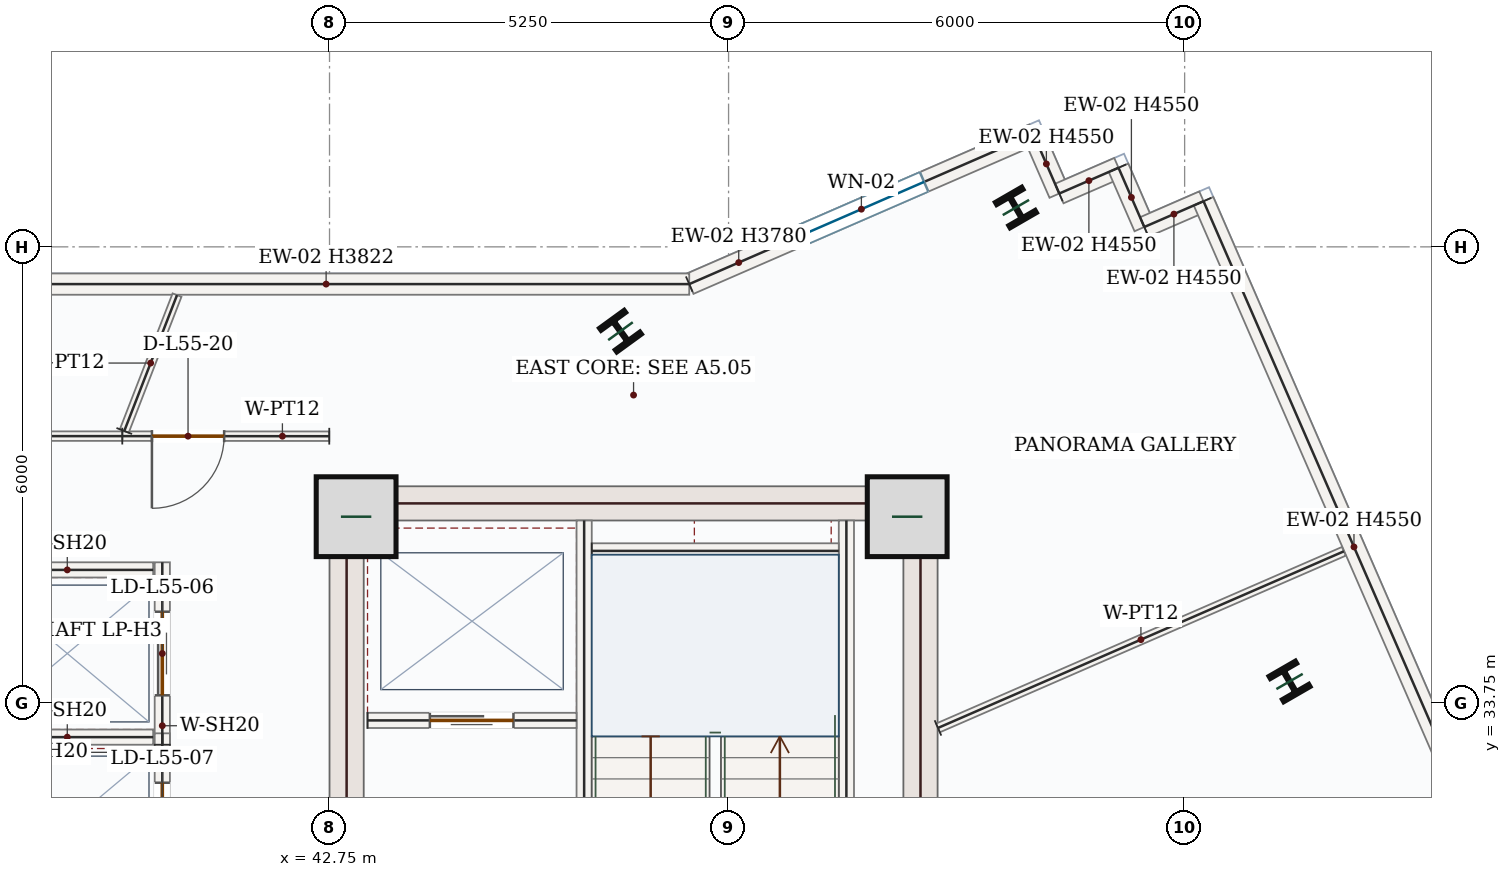
"""IFC4 building model, lengths in metres.
Left out: names, types, materials, properties, quantities, classifications, styles, units other than length and angle.
Written with IfcOpenShell. Run it as: python <this file> out.ifc"""

import sys

from ifc_helpers import new_model, si_unit, direction, frame, frame_2d, origin, origin_2d, place, context, subcontext, project, spatial, rectangle, i_section, extrude, source, transform, mapped, element, fill, save


model = new_model("IFC4")
c1 = context("Model", 3, precision=1e-05, world=origin(), true_north=direction((0.0, 1.0)))
c2 = subcontext(c1, "Body", "Model", "MODEL_VIEW")
j1 = project(units=[si_unit("LENGTHUNIT", "METRE"), si_unit("PLANEANGLEUNIT", "RADIAN")], contexts=[c1])
p1 = place(None, origin())
s1 = spatial("IfcSite", under=j1, at=p1, CompositionType="ELEMENT")
p2 = place(p1, origin())
s2 = spatial("IfcBuilding", under=s1, at=p2, CompositionType="ELEMENT")
p3 = place(p2, frame((0.0, 0.0, 234.3)))
s3 = spatial("IfcBuildingStorey", under=s2, at=p3, CompositionType="ELEMENT", Elevation=234.3)
p4 = place(p3, frame((42.975, 28.05, 0.0), z_axis=(0.0, 0.0, 1.0), x_axis=(0.0, 1.0, 0.0)))
e1 = element("IfcWall", 1, at=p4, inside=s3, PredefinedType="SHEAR", context=c2, shape_type="SweptSolid", body=[
    extrude(rectangle(XDim=8.55, YDim=0.45, at=frame_2d((4.275, 0.0))), origin(), (0.0, 0.0, 1.0), 4.55),
])
p5 = place(p4, frame((1.5, 0.0, 0.0)))
e2 = element("IfcOpeningElement", 2, at=p5, cuts=e1, PredefinedType="OPENING", context=c2, shape_type="SweptSolid", body=[
    extrude(rectangle(XDim=1.1, YDim=2.2, at=frame_2d((0.55, 1.1))), frame((0.0, 0.235, 0.0), z_axis=(0.0, -1.0, 0.0), x_axis=(1.0, 0.0, 0.0)), (0.0, 0.0, 1.0), 0.47),
])
m1 = source(origin(), c2, "Body", "SweptSolid", [
    extrude(rectangle(XDim=8.55, YDim=0.45, at=frame_2d((4.275, 0.0))), origin(), (0.0, 0.0, 1.0), 4.55),
])
p6 = place(p3, frame((50.525, 28.05, 0.0), z_axis=(0.0, 0.0, 1.0), x_axis=(0.0, 1.0, 0.0)))
e3 = element("IfcWall", 3, at=p6, inside=s3, PredefinedType="SHEAR", context=c2, shape_type="MappedRepresentation", body=[
    mapped(m1, transform((0.0, 0.0, 0.0), x_axis=(1.0, 0.0, 0.0), y_axis=(0.0, 1.0, 0.0), z_axis=(0.0, 0.0, 1.0), scale=1.0)),
])
m2 = source(origin(), c2, "Body", "SweptSolid", [
    extrude(rectangle(XDim=7.1, YDim=0.45, at=frame_2d((3.55, 0.0))), origin(), (0.0, 0.0, 1.0), 4.55),
])
p7 = place(p3, frame((43.2, 36.375, 0.0), z_axis=(0.0, 0.0, 1.0), x_axis=(1.0, 0.0, 0.0)))
e4 = element("IfcWall", 4, at=p7, inside=s3, PredefinedType="SHEAR", context=c2, shape_type="MappedRepresentation", body=[
    mapped(m2, transform((0.0, 0.0, 0.0), x_axis=(1.0, 0.0, 0.0), y_axis=(0.0, 1.0, 0.0), z_axis=(0.0, 0.0, 1.0), scale=1.0)),
])
m3 = source(origin(), c2, "Body", "SweptSolid", [
    extrude(rectangle(XDim=1.05, YDim=1.05, at=origin_2d()), origin(), (0.0, 0.0, 1.0), 4.8),
])
for number, where, z_axis, x_axis in (
    (5, (43.1, 36.2, 0.0), (0.0, 0.0, 1.0), (1.0, 0.0, 0.0)),
    (6, (50.35, 36.2, 0.0), (0.0, 0.0, 1.0), (1.0, 0.0, 0.0)),
):
    element("IfcColumn", number, at=place(p3, frame(where, z_axis=z_axis, x_axis=x_axis)), inside=s3, PredefinedType="COLUMN", context=c2, shape_type="MappedRepresentation", body=[
        mapped(m3, transform((0.0, 0.0, 0.0), x_axis=(1.0, 0.0, 0.0), y_axis=(0.0, 1.0, 0.0), z_axis=(0.0, 0.0, 1.0), scale=1.0)),
    ])
m4 = source(origin(), c2, "Body", "SweptSolid", [
    extrude(i_section(OverallWidth=0.399, OverallDepth=0.386, WebThickness=0.021, FlangeThickness=0.033, FilletRadius=0.018, at=origin_2d()), origin(), (0.0, 0.0, 1.0), 4.8),
])
for number, where, z_axis, x_axis in (
    (7, (46.578, 38.641, 0.0), (0.0, 0.0, 1.0), (0.809, 0.588, 0.0)),
    (8, (55.38, 34.032, 0.0), (0.0, 0.0, 1.0), (0.866, 0.5, 0.0)),
    (9, (51.78, 40.268, 0.0), (0.0, 0.0, 1.0), (0.866, 0.5, 0.0)),
):
    element("IfcColumn", number, at=place(p3, frame(where, z_axis=z_axis, x_axis=x_axis)), inside=s3, PredefinedType="COLUMN", context=c2, shape_type="MappedRepresentation", body=[
        mapped(m4, transform((0.0, 0.0, 0.0), x_axis=(1.0, 0.0, 0.0), y_axis=(0.0, 1.0, 0.0), z_axis=(0.0, 0.0, 1.0), scale=1.0)),
    ])
p8 = place(p3, frame((47.482, 39.26, 0.0), z_axis=(0.0, 0.0, 1.0), x_axis=(0.916937202251, 0.399031536509, 0.0)))
e10 = element("IfcWall", 10, at=p8, inside=s3, PredefinedType="SOLIDWALL", context=c2, shape_type="SweptSolid", body=[
    extrude(rectangle(XDim=4.939, YDim=0.28, at=frame_2d((2.47, 0.0))), origin(), (0.0, 0.0, 1.0), 3.78),
])
p9 = place(p8, frame((1.57, 0.0, 0.85)))
e11 = element("IfcOpeningElement", 11, at=p9, cuts=e10, PredefinedType="OPENING", context=c2, shape_type="SweptSolid", body=[
    extrude(rectangle(XDim=1.8, YDim=1.75, at=frame_2d((0.9, 0.875))), frame((0.0, 0.15, 0.0), z_axis=(0.0, -1.0, 0.0), x_axis=(1.0, 0.0, 0.0)), (0.0, 0.0, 1.0), 0.3),
])
m5 = source(origin(), c2, "Body", "SweptSolid", [
    extrude(rectangle(XDim=0.85, YDim=0.28, at=frame_2d((0.425, 0.0))), origin(), (0.0, 0.0, 1.0), 4.55),
])
for number, where, z_axis, x_axis in (
    (12, (52.011, 41.231, 0.0), (0.0, 0.0, 1.0), (0.399, -0.917, 0.0)),
    (13, (52.351, 40.451, 0.0), (0.0, 0.0, 1.0), (0.917, 0.399, 0.0)),
):
    element("IfcWall", number, at=place(p3, frame(where, z_axis=z_axis, x_axis=x_axis)), inside=s3, PredefinedType="SOLIDWALL", context=c2, shape_type="MappedRepresentation", body=[
        mapped(m5, transform((0.0, 0.0, 0.0), x_axis=(1.0, 0.0, 0.0), y_axis=(0.0, 1.0, 0.0), z_axis=(0.0, 0.0, 1.0), scale=1.0)),
    ])
m6 = source(origin(), c2, "Body", "SweptSolid", [
    extrude(rectangle(XDim=0.85, YDim=0.28, at=frame_2d((0.425, 0.0))), origin(), (0.0, 0.0, 1.0), 4.55),
])
p10 = place(p3, frame((53.13, 40.791, 0.0), z_axis=(0.0, 0.0, 1.0), x_axis=(0.399009702756, -0.916946703526, 0.0)))
e14 = element("IfcWall", 14, at=p10, inside=s3, PredefinedType="SOLIDWALL", context=c2, shape_type="MappedRepresentation", body=[
    mapped(m6, transform((0.0, 0.0, 0.0), x_axis=(1.0, 0.0, 0.0), y_axis=(0.0, 1.0, 0.0), z_axis=(0.0, 0.0, 1.0), scale=1.0)),
])
p11 = place(p3, frame((53.469, 40.011, 0.0), z_axis=(0.0, 0.0, 1.0), x_axis=(0.916992420403, 0.398904626351, 0.0)))
e15 = element("IfcWall", 15, at=p11, inside=s3, PredefinedType="SOLIDWALL", context=c2, shape_type="MappedRepresentation", body=[
    mapped(m5, transform((0.0, 0.0, 0.0), x_axis=(1.0, 0.0, 0.0), y_axis=(0.0, 1.0, 0.0), z_axis=(0.0, 0.0, 1.0), scale=1.0)),
])
m7 = source(origin(), c2, "Body", "SweptSolid", [
    extrude(rectangle(XDim=9.92, YDim=0.28, at=frame_2d((4.96, 0.0))), origin(), (0.0, 0.0, 1.0), 4.55),
])
p12 = place(p3, frame((54.249, 40.35, 0.0), z_axis=(0.0, 0.0, 1.0), x_axis=(0.398992471769, -0.916954201404, 0.0)))
e16 = element("IfcWall", 16, at=p12, inside=s3, PredefinedType="SOLIDWALL", context=c2, shape_type="MappedRepresentation", body=[
    mapped(m7, transform((0.0, 0.0, 0.0), x_axis=(1.0, 0.0, 0.0), y_axis=(0.0, 1.0, 0.0), z_axis=(0.0, 0.0, 1.0), scale=1.0)),
])
m8 = source(origin(), c2, "Body", "SweptSolid", [
    extrude(rectangle(XDim=9.554, YDim=0.28, at=frame_2d((4.777, 0.0))), origin(), (0.0, 0.0, 1.0), 3.822),
])
p13 = place(p3, frame((37.928, 39.26, 0.0), z_axis=(0.0, 0.0, 1.0), x_axis=(1.0, 0.0, 0.0)))
e17 = element("IfcWall", 17, at=p13, inside=s3, PredefinedType="SOLIDWALL", context=c2, shape_type="MappedRepresentation", body=[
    mapped(m8, transform((0.0, 0.0, 0.0), x_axis=(1.0, 0.0, 0.0), y_axis=(0.0, 1.0, 0.0), z_axis=(0.0, 0.0, 1.0), scale=1.0)),
])
m9 = source(origin(), c2, "Body", "SweptSolid", [
    extrude(rectangle(XDim=7.87, YDim=0.2, at=frame_2d((3.935, 0.0))), origin(), (0.0, 0.0, 1.0), 4.55),
])
p14 = place(p3, frame((49.55, 28.28, 0.0), z_axis=(0.0, 0.0, 1.0), x_axis=(0.0, 1.0, 0.0)))
e18 = element("IfcWall", 18, at=p14, inside=s3, PredefinedType="SOLIDWALL", context=c2, shape_type="MappedRepresentation", body=[
    mapped(m9, transform((0.0, 0.0, 0.0), x_axis=(1.0, 0.0, 0.0), y_axis=(0.0, 1.0, 0.0), z_axis=(0.0, 0.0, 1.0), scale=1.0)),
])
p15 = place(p3, frame((46.1, 28.15, 0.0), z_axis=(0.0, 0.0, 1.0), x_axis=(0.0, 1.0, 0.0)))
e19 = element("IfcWall", 19, at=p15, inside=s3, PredefinedType="SOLIDWALL", context=c2, shape_type="SweptSolid", body=[
    extrude(rectangle(XDim=8.0, YDim=0.2, at=frame_2d((4.0, 0.0))), origin(), (0.0, 0.0, 1.0), 4.55),
])
p16 = place(p15, frame((0.4, 0.0, 0.0)))
e20 = element("IfcOpeningElement", 20, at=p16, cuts=e19, PredefinedType="OPENING", context=c2, shape_type="SweptSolid", body=[
    extrude(rectangle(XDim=1.05, YDim=2.15, at=frame_2d((0.525, 1.075))), frame((0.0, 0.11, 0.0), z_axis=(0.0, -1.0, 0.0), x_axis=(1.0, 0.0, 0.0)), (0.0, 0.0, 1.0), 0.22),
])
m10 = source(origin(), c2, "Body", "SweptSolid", [
    extrude(rectangle(XDim=3.25, YDim=0.2, at=frame_2d((1.625, 0.0))), origin(), (0.0, 0.0, 1.0), 4.55),
])
p17 = place(p3, frame((46.2, 35.75, 0.0), z_axis=(0.0, 0.0, 1.0), x_axis=(1.0, 0.0, 0.0)))
e21 = element("IfcWall", 21, at=p17, inside=s3, PredefinedType="SOLIDWALL", context=c2, shape_type="MappedRepresentation", body=[
    mapped(m10, transform((0.0, 0.0, 0.0), x_axis=(1.0, 0.0, 0.0), y_axis=(0.0, 1.0, 0.0), z_axis=(0.0, 0.0, 1.0), scale=1.0)),
])
p18 = place(p3, frame((43.25, 33.52, 0.0), z_axis=(0.0, 0.0, 1.0), x_axis=(1.0, 0.0, 0.0)))
e22 = element("IfcWall", 22, at=p18, inside=s3, PredefinedType="SOLIDWALL", context=c2, shape_type="SweptSolid", body=[
    extrude(rectangle(XDim=2.75, YDim=0.2, at=frame_2d((1.375, 0.0))), origin(), (0.0, 0.0, 1.0), 4.55),
])
p19 = place(p18, frame((0.82, 0.0, 0.0)))
e23 = element("IfcOpeningElement", 23, at=p19, cuts=e22, PredefinedType="OPENING", context=c2, shape_type="SweptSolid", body=[
    extrude(rectangle(XDim=1.1, YDim=2.15, at=frame_2d((0.55, 1.075))), frame((0.0, 0.11, 0.0), z_axis=(0.0, -1.0, 0.0), x_axis=(1.0, 0.0, 0.0)), (0.0, 0.0, 1.0), 0.22),
])
p20 = place(p3, frame((40.55, 33.2, 0.0), z_axis=(0.0, 0.0, 1.0), x_axis=(0.0, 1.0, 0.0)))
e24 = element("IfcWall", 24, at=p20, inside=s3, PredefinedType="SOLIDWALL", context=c2, shape_type="SweptSolid", body=[
    extrude(rectangle(XDim=2.4, YDim=0.2, at=frame_2d((1.2, 0.0))), origin(), (0.0, 0.0, 1.0), 4.55),
])
p21 = place(p20, frame((0.65, 0.0, 0.0)))
e25 = element("IfcOpeningElement", 25, at=p21, cuts=e24, PredefinedType="OPENING", context=c2, shape_type="SweptSolid", body=[
    extrude(rectangle(XDim=1.1, YDim=2.15, at=frame_2d((0.55, 1.075))), frame((0.0, 0.11, 0.0), z_axis=(0.0, -1.0, 0.0), x_axis=(1.0, 0.0, 0.0)), (0.0, 0.0, 1.0), 0.22),
])
m11 = source(origin(), c2, "Body", "SweptSolid", [
    extrude(rectangle(XDim=2.26, YDim=0.2, at=frame_2d((1.13, 0.0))), origin(), (0.0, 0.0, 1.0), 4.55),
])
for number, where, z_axis, x_axis in (
    (26, (38.17, 33.3, 0.0), (0.0, 0.0, 1.0), (1.0, 0.0, 0.0)),
    (27, (38.17, 35.5, 0.0), (0.0, 0.0, 1.0), (1.0, 0.0, 0.0)),
):
    element("IfcWall", number, at=place(p3, frame(where, z_axis=z_axis, x_axis=x_axis)), inside=s3, PredefinedType="SOLIDWALL", context=c2, shape_type="MappedRepresentation", body=[
        mapped(m11, transform((0.0, 0.0, 0.0), x_axis=(1.0, 0.0, 0.0), y_axis=(0.0, 1.0, 0.0), z_axis=(0.0, 0.0, 1.0), scale=1.0)),
    ])
p22 = place(p3, frame((40.55, 30.95, 0.0), z_axis=(0.0, 0.0, 1.0), x_axis=(0.0, 1.0, 0.0)))
e28 = element("IfcWall", 28, at=p22, inside=s3, PredefinedType="SOLIDWALL", context=c2, shape_type="SweptSolid", body=[
    extrude(rectangle(XDim=2.4, YDim=0.2, at=frame_2d((1.2, 0.0))), origin(), (0.0, 0.0, 1.0), 4.55),
])
p23 = place(p22, frame((0.65, 0.0, 0.0)))
e29 = element("IfcOpeningElement", 29, at=p23, cuts=e28, PredefinedType="OPENING", context=c2, shape_type="SweptSolid", body=[
    extrude(rectangle(XDim=1.1, YDim=2.15, at=frame_2d((0.55, 1.075))), frame((0.0, 0.11, 0.0), z_axis=(0.0, -1.0, 0.0), x_axis=(1.0, 0.0, 0.0)), (0.0, 0.0, 1.0), 0.22),
])
m12 = source(origin(), c2, "Body", "SweptSolid", [
    extrude(rectangle(XDim=5.823, YDim=0.125, at=frame_2d((2.912, 0.0))), origin(), (0.0, 0.0, 1.0), 4.55),
])
p24 = place(p3, frame((50.755, 33.421, 0.0), z_axis=(0.0, 0.0, 1.0), x_axis=(0.916956044868, 0.398988235141, 0.0)))
e30 = element("IfcWall", 30, at=p24, inside=s3, PredefinedType="PARTITIONING", context=c2, shape_type="MappedRepresentation", body=[
    mapped(m12, transform((0.0, 0.0, 0.0), x_axis=(1.0, 0.0, 0.0), y_axis=(0.0, 1.0, 0.0), z_axis=(0.0, 0.0, 1.0), scale=1.0)),
])
p25 = place(p3, frame((42.747, 37.259, 0.0), z_axis=(0.0, 0.0, 1.0), x_axis=(-0.999999899509, 0.000448309827, 0.0)))
e31 = element("IfcWall", 31, at=p25, inside=s3, PredefinedType="PARTITIONING", context=c2, shape_type="SweptSolid", body=[
    extrude(rectangle(XDim=2.723, YDim=0.125, at=frame_2d((1.361, 0.0))), origin(), (0.0, 0.0, 1.0), 4.55),
])
p26 = place(p25, frame((1.383, 0.0, 0.0)))
e32 = element("IfcOpeningElement", 32, at=p26, cuts=e31, PredefinedType="OPENING", context=c2, shape_type="SweptSolid", body=[
    extrude(rectangle(XDim=0.95, YDim=2.15, at=frame_2d((0.475, 1.075))), frame((0.0, 0.073, 0.0), z_axis=(0.0, -1.0, 0.0), x_axis=(1.0, 0.0, 0.0)), (0.0, 0.0, 1.0), 0.145),
])
m13 = source(origin(), c2, "Body", "SweptSolid", [
    extrude(rectangle(XDim=1.917, YDim=0.125, at=frame_2d((0.959, 0.0))), origin(), (0.0, 0.0, 1.0), 4.55),
])
p27 = place(p3, frame((40.05, 37.327, 0.0), z_axis=(0.0, 0.0, 1.0), x_axis=(0.361844059872, 0.932238637011, 0.0)))
e33 = element("IfcWall", 33, at=p27, inside=s3, PredefinedType="PARTITIONING", context=c2, shape_type="MappedRepresentation", body=[
    mapped(m13, transform((0.0, 0.0, 0.0), x_axis=(1.0, 0.0, 0.0), y_axis=(0.0, 1.0, 0.0), z_axis=(0.0, 0.0, 1.0), scale=1.0)),
])
p28 = place(p3, frame((40.024, 37.26, 0.0), z_axis=(0.0, 0.0, 1.0), x_axis=(-0.999999998972, -4.5337081e-05, 0.0)))
e34 = element("IfcWall", 34, at=p28, inside=s3, PredefinedType="PARTITIONING", context=c2, shape_type="SweptSolid", body=[
    extrude(rectangle(XDim=10.77, YDim=0.125, at=frame_2d((5.385, 0.0))), origin(), (0.0, 0.0, 1.0), 4.55),
])
p29 = place(p28, frame((3.437, 0.0, 0.0)))
e35 = element("IfcOpeningElement", 35, at=p29, cuts=e34, PredefinedType="OPENING", context=c2, shape_type="SweptSolid", body=[
    extrude(rectangle(XDim=0.95, YDim=2.15, at=frame_2d((0.475, 1.075))), frame((0.0, 0.073, 0.0), z_axis=(0.0, -1.0, 0.0), x_axis=(1.0, 0.0, 0.0)), (0.0, 0.0, 1.0), 0.145),
])
m14 = source(origin(), c2, "Body", "SweptSolid", [
    extrude(rectangle(XDim=1.8, YDim=1.75, at=frame_2d((0.9, 0.875))), frame((0.0, 0.03, 0.0), z_axis=(0.0, -1.0, 0.0), x_axis=(1.0, 0.0, 0.0)), (0.0, 0.0, 1.0), 0.06),
])
p30 = place(p9, origin())
e36 = element("IfcWindow", 36, at=p30, inside=s3, PartitioningType="DOUBLE_PANEL_VERTICAL", PredefinedType="WINDOW", context=c2, shape_type="MappedRepresentation", body=[
    mapped(m14, transform((0.0, 0.0, 0.0), x_axis=(1.0, 0.0, 0.0), y_axis=(0.0, 1.0, 0.0), z_axis=(0.0, 0.0, 1.0), scale=1.0)),
])
fill(e11, e36)
m15 = source(origin(), c2, "Body", "SweptSolid", [
    extrude(rectangle(XDim=1.1, YDim=2.15, at=frame_2d((0.55, 1.075))), frame((0.0, 0.025, 0.0), z_axis=(0.0, -1.0, 0.0), x_axis=(1.0, 0.0, 0.0)), (0.0, 0.0, 1.0), 0.05),
])
p31 = place(p19, origin())
e37 = element("IfcDoor", 37, at=p31, inside=s3, OperationType="DOUBLE_DOOR_SLIDING", PredefinedType="DOOR", context=c2, shape_type="MappedRepresentation", body=[
    mapped(m15, transform((0.0, 0.0, 0.0), x_axis=(1.0, 0.0, 0.0), y_axis=(0.0, 1.0, 0.0), z_axis=(0.0, 0.0, 1.0), scale=1.0)),
])
fill(e23, e37)
p32 = place(p21, origin())
e38 = element("IfcDoor", 38, at=p32, inside=s3, OperationType="DOUBLE_DOOR_SLIDING", PredefinedType="DOOR", context=c2, shape_type="MappedRepresentation", body=[
    mapped(m15, transform((0.0, 0.0, 0.0), x_axis=(1.0, 0.0, 0.0), y_axis=(0.0, 1.0, 0.0), z_axis=(0.0, 0.0, 1.0), scale=1.0)),
])
fill(e25, e38)
p33 = place(p23, origin())
e39 = element("IfcDoor", 39, at=p33, inside=s3, OperationType="DOUBLE_DOOR_SLIDING", PredefinedType="DOOR", context=c2, shape_type="MappedRepresentation", body=[
    mapped(m15, transform((0.0, 0.0, 0.0), x_axis=(1.0, 0.0, 0.0), y_axis=(0.0, 1.0, 0.0), z_axis=(0.0, 0.0, 1.0), scale=1.0)),
])
fill(e29, e39)
m16 = source(origin(), c2, "Body", "SweptSolid", [
    extrude(rectangle(XDim=0.95, YDim=2.15, at=frame_2d((0.475, 1.075))), frame((0.0, 0.025, 0.0), z_axis=(0.0, -1.0, 0.0), x_axis=(1.0, 0.0, 0.0)), (0.0, 0.0, 1.0), 0.05),
])
p34 = place(p26, origin())
e40 = element("IfcDoor", 40, at=p34, inside=s3, OperationType="SINGLE_SWING_RIGHT", PredefinedType="DOOR", context=c2, shape_type="MappedRepresentation", body=[
    mapped(m16, transform((0.0, 0.0, 0.0), x_axis=(1.0, 0.0, 0.0), y_axis=(0.0, 1.0, 0.0), z_axis=(0.0, 0.0, 1.0), scale=1.0)),
])
fill(e32, e40)
save(model, sys.argv[1])
